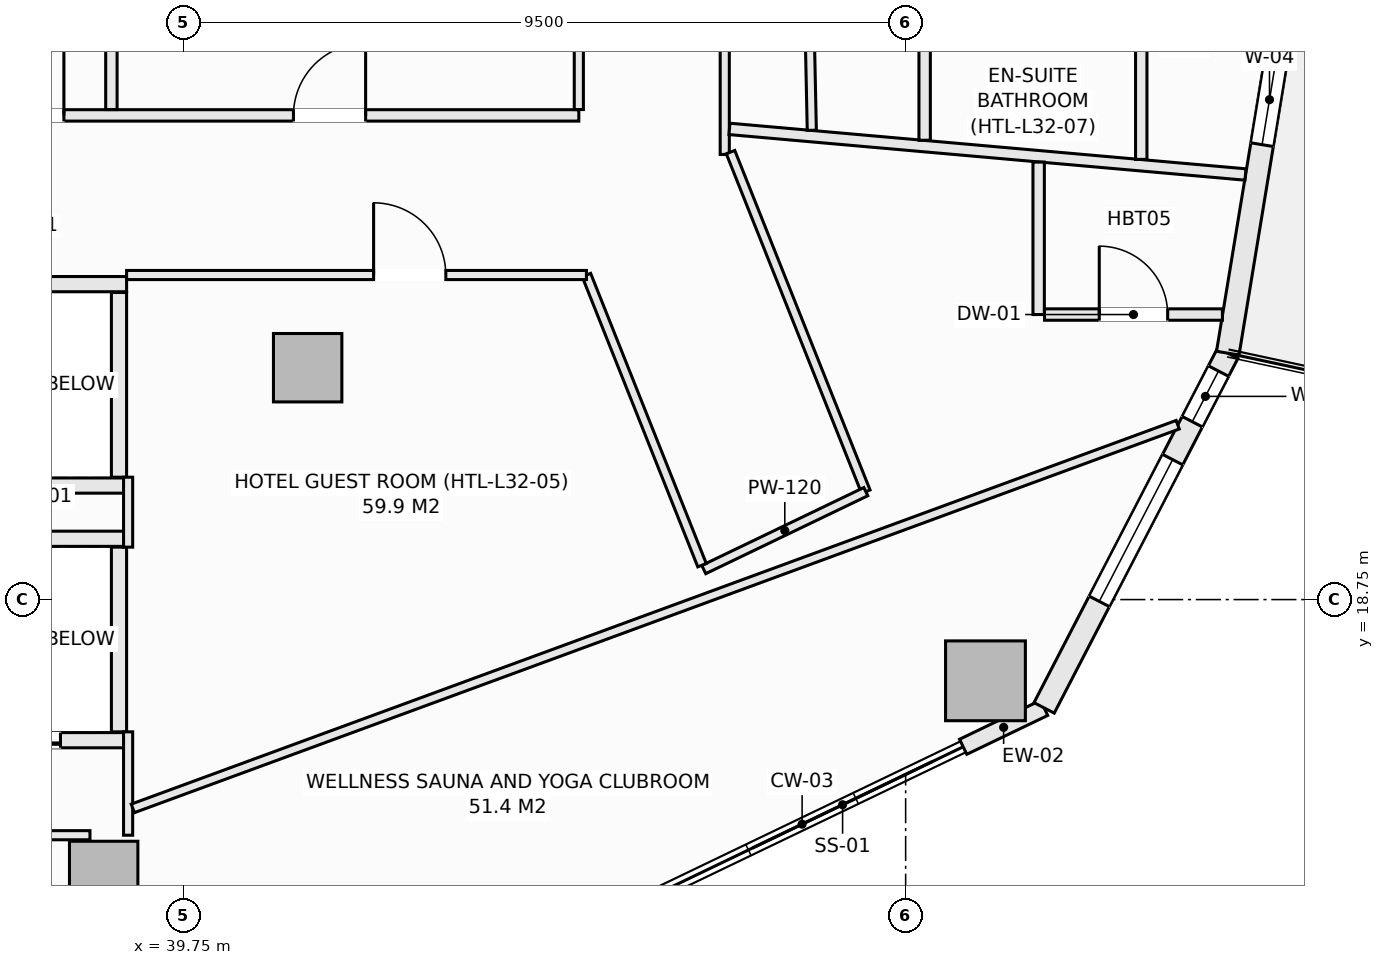
"""IFC4 building model, lengths in metres.
Left out: names, types, materials, properties, quantities, classifications, styles, units other than length and angle.
Written with IfcOpenShell. Run it as: python <this file> out.ifc"""

import sys

from ifc_helpers import new_model, si_unit, direction, frame, frame_2d, origin, origin_2d, place, context, subcontext, project, spatial, rectangle, extrude, element, fill, save


model = new_model("IFC4")
c1 = context("Model", 3, precision=1e-05, world=origin(), true_north=direction((0.0, 1.0)))
c2 = subcontext(c1, "Body", "Model", "MODEL_VIEW")
j1 = project(units=[si_unit("LENGTHUNIT", "METRE"), si_unit("PLANEANGLEUNIT", "RADIAN")], contexts=[c1])
p1 = place(None, origin())
s1 = spatial("IfcSite", under=j1, at=p1, CompositionType="ELEMENT")
p2 = place(p1, origin())
s2 = spatial("IfcBuilding", under=s1, at=p2, CompositionType="ELEMENT")
p3 = place(p2, frame((0.0, 0.0, 129.1)))
s3 = spatial("IfcBuildingStorey", under=s2, at=p3, CompositionType="ELEMENT", Elevation=129.1)
p4 = place(p3, frame((50.3, 17.681, -0.27), z_axis=(0.0, 0.0, 1.0), x_axis=(1.0, 0.0, 0.0)))
e1 = element("IfcColumn", 1, at=p4, inside=s3, PredefinedType="COLUMN", context=c2, shape_type="SweptSolid", body=[
    extrude(rectangle(XDim=1.05, YDim=1.05, at=origin_2d()), origin(), (0.0, 0.0, 1.0), 3.4),
])
for number, where, z_axis, x_axis in (
    (2, (38.698, 15.121, -0.27), (0.0, 0.0, 1.0), (1.0, 0.0, 0.0)),
    (3, (41.382, 21.801, -0.27), (0.0, 0.0, 1.0), (1.0, 0.0, 0.0)),
):
    element("IfcColumn", number, at=place(p3, frame(where, z_axis=z_axis, x_axis=x_axis)), inside=s3, PredefinedType="COLUMN", context=c2, shape_type="SweptSolid", body=[
        extrude(rectangle(XDim=0.9, YDim=0.9, at=origin_2d()), origin(), (0.0, 0.0, 1.0), 3.4),
    ])
p5 = place(p3, frame((50.007, 16.813, 0.0), z_axis=(0.0, 0.0, 1.0), x_axis=(0.90138115854, 0.433026566193, 0.0)))
e4 = element("IfcWall", 4, at=p5, inside=s3, PredefinedType="SOLIDWALL", context=c2, shape_type="SweptSolid", body=[
    extrude(rectangle(XDim=1.182, YDim=0.22, at=frame_2d((0.591, 0.0))), origin(), (0.0, 0.0, 1.0), 2.653),
])
p6 = place(p3, frame((51.072, 17.325, 0.0), z_axis=(0.0, 0.0, 1.0), x_axis=(0.459767899643, 0.888039119892, 0.0)))
e5 = element("IfcWall", 5, at=p6, inside=s3, PredefinedType="SOLIDWALL", context=c2, shape_type="SweptSolid", body=[
    extrude(rectangle(XDim=5.255, YDim=0.3, at=frame_2d((2.628, 0.0))), origin(), (0.0, 0.0, 1.0), 2.653),
])
p7 = place(p6, frame((1.578, 0.0, 0.74)))
e6 = element("IfcOpeningElement", 6, at=p7, cuts=e5, PredefinedType="OPENING", context=c2, shape_type="SweptSolid", body=[
    extrude(rectangle(XDim=2.1, YDim=1.7, at=frame_2d((1.05, 0.85))), frame((0.0, 0.16, 0.0), z_axis=(0.0, -1.0, 0.0), x_axis=(1.0, 0.0, 0.0)), (0.0, 0.0, 1.0), 0.32),
])
p8 = place(p6, frame((4.24, 0.0, 0.72)))
e7 = element("IfcOpeningElement", 7, at=p8, cuts=e5, PredefinedType="OPENING", context=c2, shape_type="SweptSolid", body=[
    extrude(rectangle(XDim=0.75, YDim=1.65, at=frame_2d((0.375, 0.825))), frame((0.0, 0.16, 0.0), z_axis=(0.0, -1.0, 0.0), x_axis=(1.0, 0.0, 0.0)), (0.0, 0.0, 1.0), 0.32),
])
p9 = place(p3, frame((53.488, 21.992, 0.0), z_axis=(0.0, 0.0, 1.0), x_axis=(0.162393944769, 0.986726003864, 0.0)))
e8 = element("IfcWall", 8, at=p9, inside=s3, PredefinedType="SOLIDWALL", context=c2, shape_type="SweptSolid", body=[
    extrude(rectangle(XDim=5.075, YDim=0.3, at=frame_2d((2.538, 0.0))), origin(), (0.0, 0.0, 1.0), 2.653),
])
p10 = place(p9, frame((2.78, 0.0, 0.72)))
e9 = element("IfcOpeningElement", 9, at=p10, cuts=e8, PredefinedType="OPENING", context=c2, shape_type="SweptSolid", body=[
    extrude(rectangle(XDim=1.2, YDim=1.65, at=frame_2d((0.6, 0.825))), frame((0.0, 0.16, 0.0), z_axis=(0.0, -1.0, 0.0), x_axis=(1.0, 0.0, 0.0)), (0.0, 0.0, 1.0), 0.32),
])
p11 = place(p3, frame((36.75, 19.55, 0.0), z_axis=(0.0, 0.0, 1.0), x_axis=(1.0, 0.0, 0.0)))
e10 = element("IfcWall", 10, at=p11, inside=s3, PredefinedType="SOLIDWALL", context=c2, shape_type="SweptSolid", body=[
    extrude(rectangle(XDim=2.25, YDim=0.2, at=frame_2d((1.125, 0.0))), origin(), (0.0, 0.0, 1.0), 3.13),
])
p12 = place(p3, frame((36.75, 16.9, 0.0), z_axis=(0.0, 0.0, 1.0), x_axis=(1.0, 0.0, 0.0)))
e11 = element("IfcWall", 11, at=p12, inside=s3, PredefinedType="SOLIDWALL", context=c2, shape_type="SweptSolid", body=[
    extrude(rectangle(XDim=2.25, YDim=0.2, at=frame_2d((1.125, 0.0))), origin(), (0.0, 0.0, 1.0), 3.13),
])
p13 = place(p12, frame((0.28, 0.0, 0.0)))
e12 = element("IfcOpeningElement", 12, at=p13, cuts=e11, PredefinedType="OPENING", context=c2, shape_type="SweptSolid", body=[
    extrude(rectangle(XDim=1.1, YDim=2.2, at=frame_2d((0.55, 1.1))), frame((0.0, 0.11, 0.0), z_axis=(0.0, -1.0, 0.0), x_axis=(1.0, 0.0, 0.0)), (0.0, 0.0, 1.0), 0.22),
])
p14 = place(p3, frame((38.9, 17.01, 0.0), z_axis=(0.0, 0.0, 1.0), x_axis=(0.0, 1.0, 0.0)))
e13 = element("IfcWall", 13, at=p14, inside=s3, PredefinedType="SOLIDWALL", context=c2, shape_type="SweptSolid", body=[
    extrude(rectangle(XDim=2.43, YDim=0.2, at=frame_2d((1.215, 0.0))), origin(), (0.0, 0.0, 1.0), 3.13),
])
for number, where, z_axis, x_axis in (
    (14, (36.75, 22.9, 0.0), (0.0, 0.0, 1.0), (1.0, 0.0, 0.0)),
    (15, (36.75, 20.25, 0.0), (0.0, 0.0, 1.0), (1.0, 0.0, 0.0)),
):
    element("IfcWall", number, at=place(p3, frame(where, z_axis=z_axis, x_axis=x_axis)), inside=s3, PredefinedType="SOLIDWALL", context=c2, shape_type="SweptSolid", body=[
        extrude(rectangle(XDim=2.25, YDim=0.2, at=frame_2d((1.125, 0.0))), origin(), (0.0, 0.0, 1.0), 3.13),
    ])
p15 = place(p3, frame((38.9, 20.36, 0.0), z_axis=(0.0, 0.0, 1.0), x_axis=(0.0, 1.0, 0.0)))
e16 = element("IfcWall", 16, at=p15, inside=s3, PredefinedType="SOLIDWALL", context=c2, shape_type="SweptSolid", body=[
    extrude(rectangle(XDim=2.43, YDim=0.2, at=frame_2d((1.215, 0.0))), origin(), (0.0, 0.0, 1.0), 3.13),
])
p16 = place(p3, frame((29.78, 25.12, 0.0), z_axis=(0.0, 0.0, 1.0), x_axis=(1.0, 0.0, 0.0)))
e17 = element("IfcWall", 17, at=p16, inside=s3, PredefinedType="PARTITIONING", context=c2, shape_type="SweptSolid", body=[
    extrude(rectangle(XDim=15.17, YDim=0.15, at=frame_2d((7.585, 0.0))), origin(), (0.0, 0.0, 1.0), 3.13),
])
p17 = place(p16, frame((3.14, 0.0, 0.0)))
e18 = element("IfcOpeningElement", 18, at=p17, cuts=e17, PredefinedType="OPENING", context=c2, shape_type="SweptSolid", body=[
    extrude(rectangle(XDim=0.95, YDim=2.1, at=frame_2d((0.475, 1.05))), frame((0.0, 0.085, 0.0), z_axis=(0.0, -1.0, 0.0), x_axis=(1.0, 0.0, 0.0)), (0.0, 0.0, 1.0), 0.17),
])
p18 = place(p16, frame((7.445, 0.0, 0.0)))
e19 = element("IfcOpeningElement", 19, at=p18, cuts=e17, PredefinedType="OPENING", context=c2, shape_type="SweptSolid", body=[
    extrude(rectangle(XDim=0.95, YDim=2.1, at=frame_2d((0.475, 1.05))), frame((0.0, 0.085, 0.0), z_axis=(0.0, -1.0, 0.0), x_axis=(1.0, 0.0, 0.0)), (0.0, 0.0, 1.0), 0.17),
])
p19 = place(p16, frame((11.415, 0.0, 0.0)))
e20 = element("IfcOpeningElement", 20, at=p19, cuts=e17, PredefinedType="OPENING", context=c2, shape_type="SweptSolid", body=[
    extrude(rectangle(XDim=0.95, YDim=2.1, at=frame_2d((0.475, 1.05))), frame((0.0, 0.085, 0.0), z_axis=(0.0, -1.0, 0.0), x_axis=(1.0, 0.0, 0.0)), (0.0, 0.0, 1.0), 0.17),
])
p20 = place(p3, frame((38.8, 25.197, 0.0), z_axis=(0.0, 0.0, 1.0), x_axis=(0.0, 1.0, 0.0)))
e21 = element("IfcWall", 21, at=p20, inside=s3, PredefinedType="PARTITIONING", context=c2, shape_type="SweptSolid", body=[
    extrude(rectangle(XDim=3.646, YDim=0.15, at=frame_2d((1.823, 0.0))), origin(), (0.0, 0.0, 1.0), 3.13),
])
p21 = place(p3, frame((39.02, 15.65, 0.0), z_axis=(0.0, 0.0, 1.0), x_axis=(0.0, 1.0, 0.0)))
e22 = element("IfcWall", 22, at=p21, inside=s3, PredefinedType="PARTITIONING", context=c2, shape_type="SweptSolid", body=[
    extrude(rectangle(XDim=1.36, YDim=0.12, at=frame_2d((0.68, 0.0))), origin(), (0.0, 0.0, 1.0), 2.505),
])
p22 = place(p3, frame((39.02, 19.44, 0.0), z_axis=(0.0, 0.0, 1.0), x_axis=(0.0, 1.0, 0.0)))
e23 = element("IfcWall", 23, at=p22, inside=s3, PredefinedType="PARTITIONING", context=c2, shape_type="SweptSolid", body=[
    extrude(rectangle(XDim=0.92, YDim=0.12, at=frame_2d((0.46, 0.0))), origin(), (0.0, 0.0, 1.0), 3.13),
])
p23 = place(p3, frame((35.95, 15.65, 0.0), z_axis=(0.0, 0.0, 1.0), x_axis=(1.0, 0.0, 0.0)))
e24 = element("IfcWall", 24, at=p23, inside=s3, PredefinedType="PARTITIONING", context=c2, shape_type="SweptSolid", body=[
    extrude(rectangle(XDim=2.568, YDim=0.12, at=frame_2d((1.284, 0.0))), origin(), (0.0, 0.0, 1.0), 3.13),
])
p24 = place(p3, frame((46.87, 24.606, 0.0), z_axis=(0.0, 0.0, 1.0), x_axis=(0.0, 1.0, 0.0)))
e25 = element("IfcWall", 25, at=p24, inside=s3, PredefinedType="PARTITIONING", context=c2, shape_type="SweptSolid", body=[
    extrude(rectangle(XDim=4.788, YDim=0.12, at=frame_2d((2.394, 0.0))), origin(), (0.0, 0.0, 1.0), 3.13),
])
p25 = place(p3, frame((46.946, 24.637, 0.0), z_axis=(0.0, 0.0, 1.0), x_axis=(0.370173596818, -0.928962597858, 0.0)))
e26 = element("IfcWall", 26, at=p25, inside=s3, PredefinedType="PARTITIONING", context=c2, shape_type="SweptSolid", body=[
    extrude(rectangle(XDim=4.809, YDim=0.12, at=frame_2d((2.404, 0.0))), origin(), (0.0, 0.0, 1.0), 3.13),
])
p26 = place(p3, frame((46.594, 19.145, 0.0), z_axis=(0.0, 0.0, 1.0), x_axis=(0.901274899261, 0.433247684312, 0.0)))
e27 = element("IfcWall", 27, at=p26, inside=s3, PredefinedType="PARTITIONING", context=c2, shape_type="SweptSolid", body=[
    extrude(rectangle(XDim=2.366, YDim=0.12, at=frame_2d((1.183, 0.0))), origin(), (0.0, 0.0, 1.0), 3.13),
])
p27 = place(p3, frame((45.05, 23.02, 0.0), z_axis=(0.0, 0.0, 1.0), x_axis=(0.370140626192, -0.928975735335, 0.0)))
e28 = element("IfcWall", 28, at=p27, inside=s3, PredefinedType="PARTITIONING", context=c2, shape_type="SweptSolid", body=[
    extrude(rectangle(XDim=4.109, YDim=0.12, at=frame_2d((2.055, 0.0))), origin(), (0.0, 0.0, 1.0), 3.13),
])
p28 = place(p3, frame((39.0, 23.02, 0.0), z_axis=(0.0, 0.0, 1.0), x_axis=(1.0, 0.0, 0.0)))
e29 = element("IfcWall", 29, at=p28, inside=s3, PredefinedType="PARTITIONING", context=c2, shape_type="SweptSolid", body=[
    extrude(rectangle(XDim=6.05, YDim=0.12, at=frame_2d((3.025, 0.0))), origin(), (0.0, 0.0, 1.0), 3.13),
])
p29 = place(p28, frame((3.25, 0.0, 0.0)))
e30 = element("IfcOpeningElement", 30, at=p29, cuts=e29, PredefinedType="OPENING", context=c2, shape_type="SweptSolid", body=[
    extrude(rectangle(XDim=0.95, YDim=2.1, at=frame_2d((0.475, 1.05))), frame((0.0, 0.07, 0.0), z_axis=(0.0, -1.0, 0.0), x_axis=(1.0, 0.0, 0.0)), (0.0, 0.0, 1.0), 0.14),
])
p30 = place(p3, frame((44.95, 25.197, 0.0), z_axis=(0.0, 0.0, 1.0), x_axis=(0.0, 1.0, 0.0)))
e31 = element("IfcWall", 31, at=p30, inside=s3, PredefinedType="PARTITIONING", context=c2, shape_type="SweptSolid", body=[
    extrude(rectangle(XDim=3.646, YDim=0.12, at=frame_2d((1.823, 0.0))), origin(), (0.0, 0.0, 1.0), 3.13),
])
p31 = place(p3, frame((46.932, 24.942, 0.0), z_axis=(0.0, 0.0, 1.0), x_axis=(0.996119604576, -0.088009848195, 0.0)))
e32 = element("IfcWall", 32, at=p31, inside=s3, PredefinedType="PARTITIONING", context=c2, shape_type="SweptSolid", body=[
    extrude(rectangle(XDim=6.816, YDim=0.15, at=frame_2d((3.408, 0.0))), origin(), (0.0, 0.0, 1.0), 3.13),
])
p32 = place(p3, frame((39.082, 16.003, 0.0), z_axis=(0.0, 0.0, 1.0), x_axis=(0.93872535699, 0.344666076288, 0.0)))
e33 = element("IfcWall", 33, at=p32, inside=s3, PredefinedType="PARTITIONING", context=c2, shape_type="SweptSolid", body=[
    extrude(rectangle(XDim=14.645, YDim=0.12, at=frame_2d((7.323, 0.0))), origin(), (0.0, 0.0, 1.0), 3.13),
])
p33 = place(p3, frame((51.0, 22.5, 0.0), z_axis=(0.0, 0.0, 1.0), x_axis=(0.0, 1.0, 0.0)))
e34 = element("IfcWall", 34, at=p33, inside=s3, PredefinedType="PARTITIONING", context=c2, shape_type="SweptSolid", body=[
    extrude(rectangle(XDim=2.006, YDim=0.15, at=frame_2d((1.003, 0.0))), origin(), (0.0, 0.0, 1.0), 3.13),
])
p34 = place(p3, frame((51.077, 22.5, 0.0), z_axis=(0.0, 0.0, 1.0), x_axis=(1.0, 0.0, 0.0)))
e35 = element("IfcWall", 35, at=p34, inside=s3, PredefinedType="PARTITIONING", context=c2, shape_type="SweptSolid", body=[
    extrude(rectangle(XDim=2.341, YDim=0.15, at=frame_2d((1.17, 0.0))), origin(), (0.0, 0.0, 1.0), 2.812),
])
p35 = place(p34, frame((0.72, 0.0, 0.0)))
e36 = element("IfcOpeningElement", 36, at=p35, cuts=e35, PredefinedType="OPENING", context=c2, shape_type="SweptSolid", body=[
    extrude(rectangle(XDim=0.9, YDim=2.1, at=frame_2d((0.45, 1.05))), frame((0.0, 0.085, 0.0), z_axis=(0.0, -1.0, 0.0), x_axis=(1.0, 0.0, 0.0)), (0.0, 0.0, 1.0), 0.17),
])
p36 = place(p3, frame((52.35, 24.541, 0.0), z_axis=(0.0, 0.0, 1.0), x_axis=(0.0, 1.0, 0.0)))
e37 = element("IfcWall", 37, at=p36, inside=s3, PredefinedType="PARTITIONING", context=c2, shape_type="SweptSolid", body=[
    extrude(rectangle(XDim=2.461, YDim=0.15, at=frame_2d((1.23, 0.0))), origin(), (0.0, 0.0, 1.0), 3.13),
])
p37 = place(p3, frame((49.5, 24.793, 0.0), z_axis=(0.0, 0.0, 1.0), x_axis=(0.0, 1.0, 0.0)))
e38 = element("IfcWall", 38, at=p37, inside=s3, PredefinedType="PARTITIONING", context=c2, shape_type="SweptSolid", body=[
    extrude(rectangle(XDim=2.132, YDim=0.15, at=frame_2d((1.066, 0.0))), origin(), (0.0, 0.0, 1.0), 3.13),
])
p38 = place(p3, frame((47.876, 31.53, 0.0), z_axis=(0.0, 0.0, 1.0), x_axis=(0.021060407881, -0.999778205013, 0.0)))
e39 = element("IfcWall", 39, at=p38, inside=s3, PredefinedType="PARTITIONING", context=c2, shape_type="SweptSolid", body=[
    extrude(rectangle(XDim=6.608, YDim=0.12, at=frame_2d((3.304, 0.0))), origin(), (0.0, 0.0, 1.0), 3.13),
])
p39 = place(p7, origin())
e40 = element("IfcWindow", 40, at=p39, inside=s3, PartitioningType="SINGLE_PANEL", PredefinedType="WINDOW", context=c2, shape_type="SweptSolid", body=[
    extrude(rectangle(XDim=2.1, YDim=1.7, at=frame_2d((1.05, 0.85))), frame((0.0, 0.03, 0.0), z_axis=(0.0, -1.0, 0.0), x_axis=(1.0, 0.0, 0.0)), (0.0, 0.0, 1.0), 0.06),
])
fill(e6, e40)
p40 = place(p10, origin())
e41 = element("IfcWindow", 41, at=p40, inside=s3, PartitioningType="SINGLE_PANEL", PredefinedType="WINDOW", context=c2, shape_type="SweptSolid", body=[
    extrude(rectangle(XDim=1.2, YDim=1.65, at=frame_2d((0.6, 0.825))), frame((0.0, 0.03, 0.0), z_axis=(0.0, -1.0, 0.0), x_axis=(1.0, 0.0, 0.0)), (0.0, 0.0, 1.0), 0.06),
])
fill(e9, e41)
p41 = place(p13, origin())
e42 = element("IfcDoor", 42, at=p41, inside=s3, OperationType="SLIDING_TO_LEFT", PredefinedType="DOOR", context=c2, shape_type="SweptSolid", body=[
    extrude(rectangle(XDim=1.1, YDim=2.2, at=frame_2d((0.55, 1.1))), frame((0.0, 0.025, 0.0), z_axis=(0.0, -1.0, 0.0), x_axis=(1.0, 0.0, 0.0)), (0.0, 0.0, 1.0), 0.05),
])
fill(e12, e42)
p42 = place(p18, origin())
e43 = element("IfcDoor", 43, at=p42, inside=s3, OperationType="SINGLE_SWING_RIGHT", PredefinedType="DOOR", context=c2, shape_type="SweptSolid", body=[
    extrude(rectangle(XDim=0.95, YDim=2.1, at=frame_2d((0.475, 1.05))), frame((0.0, 0.025, 0.0), z_axis=(0.0, -1.0, 0.0), x_axis=(1.0, 0.0, 0.0)), (0.0, 0.0, 1.0), 0.05),
])
fill(e19, e43)
p43 = place(p29, origin())
e44 = element("IfcDoor", 44, at=p43, inside=s3, OperationType="SINGLE_SWING_LEFT", PredefinedType="DOOR", context=c2, shape_type="SweptSolid", body=[
    extrude(rectangle(XDim=0.95, YDim=2.1, at=frame_2d((0.475, 1.05))), frame((0.0, 0.025, 0.0), z_axis=(0.0, -1.0, 0.0), x_axis=(1.0, 0.0, 0.0)), (0.0, 0.0, 1.0), 0.05),
])
fill(e30, e44)
p44 = place(p19, origin())
e45 = element("IfcDoor", 45, at=p44, inside=s3, OperationType="SINGLE_SWING_RIGHT", PredefinedType="DOOR", context=c2, shape_type="SweptSolid", body=[
    extrude(rectangle(XDim=0.95, YDim=2.1, at=frame_2d((0.475, 1.05))), frame((0.0, 0.025, 0.0), z_axis=(0.0, -1.0, 0.0), x_axis=(1.0, 0.0, 0.0)), (0.0, 0.0, 1.0), 0.05),
])
fill(e20, e45)
p45 = place(p35, origin())
e46 = element("IfcDoor", 46, at=p45, inside=s3, OperationType="SINGLE_SWING_LEFT", PredefinedType="DOOR", context=c2, shape_type="SweptSolid", body=[
    extrude(rectangle(XDim=0.9, YDim=2.1, at=frame_2d((0.45, 1.05))), frame((0.0, 0.025, 0.0), z_axis=(0.0, -1.0, 0.0), x_axis=(1.0, 0.0, 0.0)), (0.0, 0.0, 1.0), 0.05),
])
fill(e36, e46)
p46 = place(p8, origin())
e47 = element("IfcWindow", 47, at=p46, inside=s3, PartitioningType="SINGLE_PANEL", PredefinedType="WINDOW", context=c2, shape_type="SweptSolid", body=[
    extrude(rectangle(XDim=0.75, YDim=1.65, at=frame_2d((0.375, 0.825))), frame((0.0, 0.03, 0.0), z_axis=(0.0, -1.0, 0.0), x_axis=(1.0, 0.0, 0.0)), (0.0, 0.0, 1.0), 0.06),
])
fill(e7, e47)
save(model, sys.argv[1])
